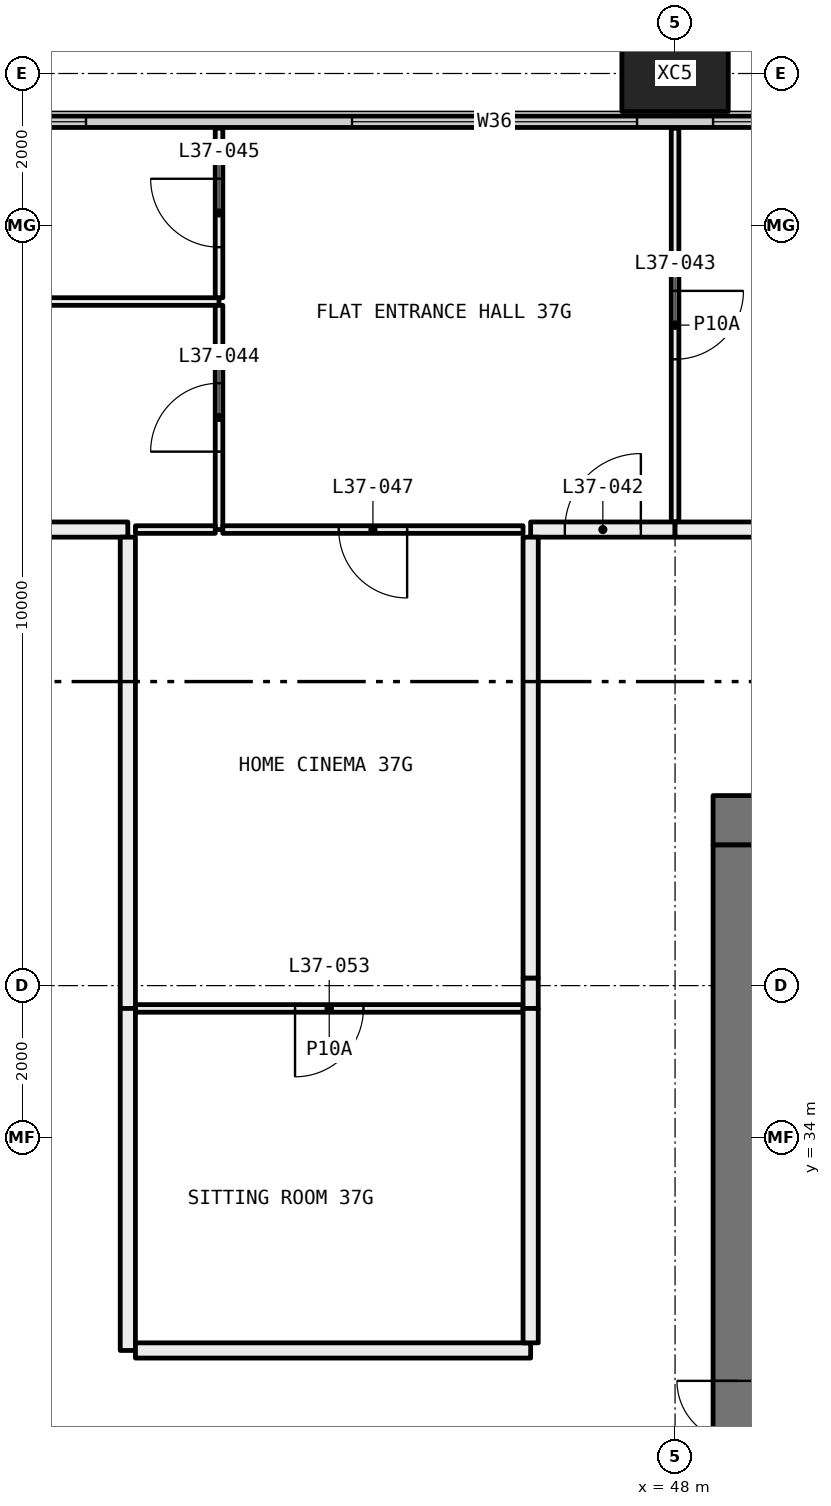
"""IFC4 building model, lengths in metres.
Left out: names, types, materials, properties, quantities, classifications, styles, units other than length and angle.
Written with IfcOpenShell. Run it as: python <this file> out.ifc"""

import sys

from ifc_helpers import new_model, si_unit, direction, frame, frame_2d, origin, origin_2d, place, context, subcontext, project, spatial, rectangle, hollow_rectangle, extrude, element, fill, save


model = new_model("IFC4")
c1 = context("Model", 3, precision=1e-05, world=origin(), true_north=direction((0.0, 1.0)))
c2 = subcontext(c1, "Body", "Model", "MODEL_VIEW")
j1 = project(units=[si_unit("LENGTHUNIT", "METRE"), si_unit("PLANEANGLEUNIT", "RADIAN")], contexts=[c1])
p1 = place(None, origin())
s1 = spatial("IfcSite", under=j1, at=p1, CompositionType="ELEMENT")
p2 = place(p1, origin())
s2 = spatial("IfcBuilding", under=s1, at=p2, CompositionType="ELEMENT")
p3 = place(p2, frame((0.0, 0.0, 141.45)))
s3 = spatial("IfcBuildingStorey", under=s2, at=p3, CompositionType="ELEMENT", Elevation=141.45)
p4 = place(p3, frame((48.0, 48.0, -0.4), z_axis=(0.0, 0.0, 1.0), x_axis=(1.0, 0.0, 0.0)))
e1 = element("IfcColumn", 1, at=p4, inside=s3, PredefinedType="COLUMN", context=c2, shape_type="SweptSolid", body=[
    extrude(hollow_rectangle(XDim=1.4, YDim=1.0, WallThickness=0.055, at=origin_2d()), origin(), (0.0, 0.0, 1.0), 3.45),
])
p5 = place(p3, frame((6.56, 47.365, 0.0), z_axis=(0.0, 0.0, 1.0), x_axis=(1.0, 0.0, 0.0)))
e2 = element("IfcWall", 2, at=p5, inside=s3, PredefinedType="ELEMENTEDWALL", context=c2, shape_type="SweptSolid", body=[
    extrude(rectangle(XDim=58.88, YDim=0.15, at=frame_2d((29.44, 0.0))), origin(), (0.0, 0.0, 1.0), 3.05),
])
p6 = place(p5, frame((0.44, 0.0, 0.45)))
e3 = element("IfcOpeningElement", 3, at=p6, cuts=e2, PredefinedType="OPENING", context=c2, shape_type="SweptSolid", body=[
    extrude(rectangle(XDim=4.5, YDim=2.55, at=frame_2d((2.25, 1.275))), frame((0.0, 0.085, 0.0), z_axis=(0.0, -1.0, 0.0), x_axis=(1.0, 0.0, 0.0)), (0.0, 0.0, 1.0), 0.17),
])
p7 = place(p5, frame((5.94, 0.0, 0.45)))
e4 = element("IfcOpeningElement", 4, at=p7, cuts=e2, PredefinedType="OPENING", context=c2, shape_type="SweptSolid", body=[
    extrude(rectangle(XDim=3.75, YDim=2.55, at=frame_2d((1.875, 1.275))), frame((0.0, 0.085, 0.0), z_axis=(0.0, -1.0, 0.0), x_axis=(1.0, 0.0, 0.0)), (0.0, 0.0, 1.0), 0.17),
])
p8 = place(p5, frame((13.19, 0.0, 0.45)))
e5 = element("IfcOpeningElement", 5, at=p8, cuts=e2, PredefinedType="OPENING", context=c2, shape_type="SweptSolid", body=[
    extrude(rectangle(XDim=3.75, YDim=2.55, at=frame_2d((1.875, 1.275))), frame((0.0, 0.085, 0.0), z_axis=(0.0, -1.0, 0.0), x_axis=(1.0, 0.0, 0.0)), (0.0, 0.0, 1.0), 0.17),
])
p9 = place(p5, frame((17.94, 0.0, 0.45)))
e6 = element("IfcOpeningElement", 6, at=p9, cuts=e2, PredefinedType="OPENING", context=c2, shape_type="SweptSolid", body=[
    extrude(rectangle(XDim=3.75, YDim=2.55, at=frame_2d((1.875, 1.275))), frame((0.0, 0.085, 0.0), z_axis=(0.0, -1.0, 0.0), x_axis=(1.0, 0.0, 0.0)), (0.0, 0.0, 1.0), 0.17),
])
p10 = place(p5, frame((25.19, 0.0, 0.45)))
e7 = element("IfcOpeningElement", 7, at=p10, cuts=e2, PredefinedType="OPENING", context=c2, shape_type="SweptSolid", body=[
    extrude(rectangle(XDim=0.75, YDim=2.55, at=frame_2d((0.375, 1.275))), frame((0.0, 0.085, 0.0), z_axis=(0.0, -1.0, 0.0), x_axis=(1.0, 0.0, 0.0)), (0.0, 0.0, 1.0), 0.17),
])
p11 = place(p5, frame((26.94, 0.0, 0.45)))
e8 = element("IfcOpeningElement", 8, at=p11, cuts=e2, PredefinedType="OPENING", context=c2, shape_type="SweptSolid", body=[
    extrude(rectangle(XDim=2.0, YDim=2.55, at=frame_2d((1.0, 1.275))), frame((0.0, 0.085, 0.0), z_axis=(0.0, -1.0, 0.0), x_axis=(1.0, 0.0, 0.0)), (0.0, 0.0, 1.0), 0.17),
])
p12 = place(p5, frame((29.94, 0.0, 0.45)))
e9 = element("IfcOpeningElement", 9, at=p12, cuts=e2, PredefinedType="OPENING", context=c2, shape_type="SweptSolid", body=[
    extrude(rectangle(XDim=3.75, YDim=2.55, at=frame_2d((1.875, 1.275))), frame((0.0, 0.085, 0.0), z_axis=(0.0, -1.0, 0.0), x_axis=(1.0, 0.0, 0.0)), (0.0, 0.0, 1.0), 0.17),
])
p13 = place(p5, frame((37.19, 0.0, 0.45)))
e10 = element("IfcOpeningElement", 10, at=p13, cuts=e2, PredefinedType="OPENING", context=c2, shape_type="SweptSolid", body=[
    extrude(rectangle(XDim=3.75, YDim=2.55, at=frame_2d((1.875, 1.275))), frame((0.0, 0.085, 0.0), z_axis=(0.0, -1.0, 0.0), x_axis=(1.0, 0.0, 0.0)), (0.0, 0.0, 1.0), 0.17),
])
p14 = place(p5, frame((41.94, 0.0, 0.45)))
e11 = element("IfcOpeningElement", 11, at=p14, cuts=e2, PredefinedType="OPENING", context=c2, shape_type="SweptSolid", body=[
    extrude(rectangle(XDim=3.75, YDim=2.55, at=frame_2d((1.875, 1.275))), frame((0.0, 0.085, 0.0), z_axis=(0.0, -1.0, 0.0), x_axis=(1.0, 0.0, 0.0)), (0.0, 0.0, 1.0), 0.17),
])
p15 = place(p5, frame((49.19, 0.0, 0.45)))
e12 = element("IfcOpeningElement", 12, at=p15, cuts=e2, PredefinedType="OPENING", context=c2, shape_type="SweptSolid", body=[
    extrude(rectangle(XDim=0.75, YDim=2.55, at=frame_2d((0.375, 1.275))), frame((0.0, 0.085, 0.0), z_axis=(0.0, -1.0, 0.0), x_axis=(1.0, 0.0, 0.0)), (0.0, 0.0, 1.0), 0.17),
])
p16 = place(p5, frame((50.94, 0.0, 0.45)))
e13 = element("IfcOpeningElement", 13, at=p16, cuts=e2, PredefinedType="OPENING", context=c2, shape_type="SweptSolid", body=[
    extrude(rectangle(XDim=2.0, YDim=2.55, at=frame_2d((1.0, 1.275))), frame((0.0, 0.085, 0.0), z_axis=(0.0, -1.0, 0.0), x_axis=(1.0, 0.0, 0.0)), (0.0, 0.0, 1.0), 0.17),
])
p17 = place(p5, frame((53.94, 0.0, 0.45)))
e14 = element("IfcOpeningElement", 14, at=p17, cuts=e2, PredefinedType="OPENING", context=c2, shape_type="SweptSolid", body=[
    extrude(rectangle(XDim=4.5, YDim=2.55, at=frame_2d((2.25, 1.275))), frame((0.0, 0.085, 0.0), z_axis=(0.0, -1.0, 0.0), x_axis=(1.0, 0.0, 0.0)), (0.0, 0.0, 1.0), 0.17),
])
p18 = place(p3, frame((42.0, 45.0, 0.0), z_axis=(0.0, 0.0, 1.0), x_axis=(-1.0, 0.0, 0.0)))
e15 = element("IfcWall", 15, at=p18, inside=s3, PredefinedType="PARTITIONING", context=c2, shape_type="SweptSolid", body=[
    extrude(rectangle(XDim=6.1, YDim=0.1, at=frame_2d((3.05, 0.0))), origin(), (0.0, 0.0, 1.0), 2.45),
])
p19 = place(p3, frame((42.0, 42.0, 0.0), z_axis=(0.0, 0.0, 1.0), x_axis=(0.0, 1.0, 0.0)))
e16 = element("IfcWall", 16, at=p19, inside=s3, PredefinedType="PARTITIONING", context=c2, shape_type="SweptSolid", body=[
    extrude(rectangle(XDim=2.95, YDim=0.1, at=frame_2d((1.475, 0.0))), origin(), (0.0, 0.0, 1.0), 3.05),
])
p20 = place(p19, frame((1.025, 0.0, 0.0)))
e17 = element("IfcOpeningElement", 17, at=p20, cuts=e16, PredefinedType="OPENING", context=c2, shape_type="SweptSolid", body=[
    extrude(rectangle(XDim=0.9, YDim=2.1, at=frame_2d((0.45, 1.05))), frame((0.0, 0.06, 0.0), z_axis=(0.0, -1.0, 0.0), x_axis=(1.0, 0.0, 0.0)), (0.0, 0.0, 1.0), 0.12),
])
p21 = place(p3, frame((40.9, 42.0, 0.0), z_axis=(0.0, 0.0, 1.0), x_axis=(1.0, 0.0, 0.0)))
e18 = element("IfcWall", 18, at=p21, inside=s3, PredefinedType="PARTITIONING", context=c2, shape_type="SweptSolid", body=[
    extrude(rectangle(XDim=1.05, YDim=0.1, at=frame_2d((0.525, 0.0))), origin(), (0.0, 0.0, 1.0), 3.05),
])
p22 = place(p3, frame((38.4, 42.0, 0.0), z_axis=(0.0, 0.0, 1.0), x_axis=(1.0, 0.0, 0.0)))
e19 = element("IfcWall", 19, at=p22, inside=s3, PredefinedType="PARTITIONING", context=c2, shape_type="SweptSolid", body=[
    extrude(rectangle(XDim=2.4, YDim=0.2, at=frame_2d((1.2, 0.0))), origin(), (0.0, 0.0, 1.0), 3.05),
])
p23 = place(p3, frame((42.0, 45.05, 0.0), z_axis=(0.0, 0.0, 1.0), x_axis=(0.0, 1.0, 0.0)))
e20 = element("IfcWall", 20, at=p23, inside=s3, PredefinedType="PARTITIONING", context=c2, shape_type="SweptSolid", body=[
    extrude(rectangle(XDim=2.23, YDim=0.1, at=frame_2d((1.115, 0.0))), origin(), (0.0, 0.0, 1.0), 3.05),
])
p24 = place(p23, frame((0.665, 0.0, 0.0)))
e21 = element("IfcOpeningElement", 21, at=p24, cuts=e20, PredefinedType="OPENING", context=c2, shape_type="SweptSolid", body=[
    extrude(rectangle(XDim=0.9, YDim=2.1, at=frame_2d((0.45, 1.05))), frame((0.0, 0.06, 0.0), z_axis=(0.0, -1.0, 0.0), x_axis=(1.0, 0.0, 0.0)), (0.0, 0.0, 1.0), 0.12),
])
p25 = place(p3, frame((48.0, 42.1, 0.0), z_axis=(0.0, 0.0, 1.0), x_axis=(0.0, 1.0, 0.0)))
e22 = element("IfcWall", 22, at=p25, inside=s3, PredefinedType="PARTITIONING", context=c2, shape_type="SweptSolid", body=[
    extrude(rectangle(XDim=5.18, YDim=0.1, at=frame_2d((2.59, 0.0))), origin(), (0.0, 0.0, 1.0), 3.05),
])
p26 = place(p25, frame((2.14, 0.0, 0.0)))
e23 = element("IfcOpeningElement", 23, at=p26, cuts=e22, PredefinedType="OPENING", context=c2, shape_type="SweptSolid", body=[
    extrude(rectangle(XDim=0.9, YDim=2.1, at=frame_2d((0.45, 1.05))), frame((0.0, 0.06, 0.0), z_axis=(0.0, -1.0, 0.0), x_axis=(1.0, 0.0, 0.0)), (0.0, 0.0, 1.0), 0.12),
])
p27 = place(p3, frame((42.05, 42.0, 0.0), z_axis=(0.0, 0.0, 1.0), x_axis=(1.0, 0.0, 0.0)))
e24 = element("IfcWall", 24, at=p27, inside=s3, PredefinedType="PARTITIONING", context=c2, shape_type="SweptSolid", body=[
    extrude(rectangle(XDim=3.95, YDim=0.1, at=frame_2d((1.975, 0.0))), origin(), (0.0, 0.0, 1.0), 3.05),
])
p28 = place(p27, frame((1.525, 0.0, 0.0)))
e25 = element("IfcOpeningElement", 25, at=p28, cuts=e24, PredefinedType="OPENING", context=c2, shape_type="SweptSolid", body=[
    extrude(rectangle(XDim=0.9, YDim=2.1, at=frame_2d((0.45, 1.05))), frame((0.0, 0.06, 0.0), z_axis=(0.0, -1.0, 0.0), x_axis=(1.0, 0.0, 0.0)), (0.0, 0.0, 1.0), 0.12),
])
p29 = place(p3, frame((46.1, 42.0, 0.0), z_axis=(0.0, 0.0, 1.0), x_axis=(1.0, 0.0, 0.0)))
e26 = element("IfcWall", 26, at=p29, inside=s3, PredefinedType="PARTITIONING", context=c2, shape_type="SweptSolid", body=[
    extrude(rectangle(XDim=1.9, YDim=0.2, at=frame_2d((0.95, 0.0))), origin(), (0.0, 0.0, 1.0), 3.05),
])
p30 = place(p29, frame((0.45, 0.0, 0.0)))
e27 = element("IfcOpeningElement", 27, at=p30, cuts=e26, PredefinedType="OPENING", context=c2, shape_type="SweptSolid", body=[
    extrude(rectangle(XDim=1.0, YDim=2.1, at=frame_2d((0.5, 1.05))), frame((0.0, 0.11, 0.0), z_axis=(0.0, -1.0, 0.0), x_axis=(1.0, 0.0, 0.0)), (0.0, 0.0, 1.0), 0.22),
])
p31 = place(p3, frame((48.0, 42.0, 0.0), z_axis=(0.0, 0.0, 1.0), x_axis=(1.0, 0.0, 0.0)))
e28 = element("IfcWall", 28, at=p31, inside=s3, PredefinedType="PARTITIONING", context=c2, shape_type="SweptSolid", body=[
    extrude(rectangle(XDim=12.0, YDim=0.2, at=frame_2d((6.0, 0.0))), origin(), (0.0, 0.0, 1.0), 3.05),
])
p32 = place(p3, frame((40.9, 35.7, 0.0), z_axis=(0.0, 0.0, 1.0), x_axis=(1.0, 0.0, 0.0)))
e29 = element("IfcWall", 29, at=p32, inside=s3, PredefinedType="PARTITIONING", context=c2, shape_type="SweptSolid", body=[
    extrude(rectangle(XDim=5.1, YDim=0.1, at=frame_2d((2.55, 0.0))), origin(), (0.0, 0.0, 1.0), 3.05),
])
p33 = place(p32, frame((2.1, 0.0, 0.0)))
e30 = element("IfcOpeningElement", 30, at=p33, cuts=e29, PredefinedType="OPENING", context=c2, shape_type="SweptSolid", body=[
    extrude(rectangle(XDim=0.9, YDim=2.1, at=frame_2d((0.45, 1.05))), frame((0.0, 0.06, 0.0), z_axis=(0.0, -1.0, 0.0), x_axis=(1.0, 0.0, 0.0)), (0.0, 0.0, 1.0), 0.12),
])
p34 = place(p3, frame((40.8, 41.9, 0.0), z_axis=(0.0, 0.0, 1.0), x_axis=(0.0, -1.0, 0.0)))
e31 = element("IfcWall", 31, at=p34, inside=s3, PredefinedType="PARTITIONING", context=c2, shape_type="SweptSolid", body=[
    extrude(rectangle(XDim=6.2, YDim=0.2, at=frame_2d((3.1, 0.0))), origin(), (0.0, 0.0, 1.0), 2.45),
])
p35 = place(p3, frame((46.1, 35.7, 0.0), z_axis=(0.0, 0.0, 1.0), x_axis=(0.0, 1.0, 0.0)))
e32 = element("IfcWall", 32, at=p35, inside=s3, PredefinedType="PARTITIONING", context=c2, shape_type="SweptSolid", body=[
    extrude(rectangle(XDim=0.4, YDim=0.2, at=frame_2d((0.2, 0.0))), origin(), (0.0, 0.0, 1.0), 2.45),
])
p36 = place(p3, frame((46.1, 36.1, 0.0), z_axis=(0.0, 0.0, 1.0), x_axis=(0.0, 1.0, 0.0)))
e33 = element("IfcWall", 33, at=p36, inside=s3, PredefinedType="PARTITIONING", context=c2, shape_type="SweptSolid", body=[
    extrude(rectangle(XDim=5.8, YDim=0.2, at=frame_2d((2.9, 0.0))), origin(), (0.0, 0.0, 1.0), 3.05),
])
p37 = place(p3, frame((40.8, 35.7, 0.0), z_axis=(0.0, 0.0, 1.0), x_axis=(0.0, -1.0, 0.0)))
e34 = element("IfcWall", 34, at=p37, inside=s3, PredefinedType="PARTITIONING", context=c2, shape_type="SweptSolid", body=[
    extrude(rectangle(XDim=4.5, YDim=0.2, at=frame_2d((2.25, 0.0))), origin(), (0.0, 0.0, 1.0), 3.05),
])
p38 = place(p3, frame((40.9, 31.2, 0.0), z_axis=(0.0, 0.0, 1.0), x_axis=(1.0, 0.0, 0.0)))
e35 = element("IfcWall", 35, at=p38, inside=s3, PredefinedType="PARTITIONING", context=c2, shape_type="SweptSolid", body=[
    extrude(rectangle(XDim=5.2, YDim=0.2, at=frame_2d((2.6, 0.0))), origin(), (0.0, 0.0, 1.0), 3.05),
])
p39 = place(p3, frame((46.1, 31.3, 0.0), z_axis=(0.0, 0.0, 1.0), x_axis=(0.0, 1.0, 0.0)))
e36 = element("IfcWall", 36, at=p39, inside=s3, PredefinedType="PARTITIONING", context=c2, shape_type="SweptSolid", body=[
    extrude(rectangle(XDim=4.4, YDim=0.2, at=frame_2d((2.2, 0.0))), origin(), (0.0, 0.0, 1.0), 3.05),
])
p40 = place(p3, frame((59.5, 38.175, 0.0), z_axis=(0.0, 0.0, 1.0), x_axis=(-1.0, 0.0, 0.0)))
e37 = element("IfcWall", 37, at=p40, inside=s3, PredefinedType="SHEAR", context=c2, shape_type="SweptSolid", body=[
    extrude(rectangle(XDim=11.0, YDim=0.65, at=frame_2d((5.5, 0.0))), origin(), (0.0, 0.0, 1.0), 3.05),
])
p41 = place(p40, frame((8.475, 0.0, 0.0)))
e38 = element("IfcOpeningElement", 38, at=p41, cuts=e37, PredefinedType="OPENING", context=c2, shape_type="SweptSolid", body=[
    extrude(rectangle(XDim=1.6, YDim=2.1, at=frame_2d((0.8, 1.05))), frame((0.0, 0.335, 0.0), z_axis=(0.0, -1.0, 0.0), x_axis=(1.0, 0.0, 0.0)), (0.0, 0.0, 1.0), 0.67),
])
p42 = place(p3, frame((48.825, 22.15, 0.0), z_axis=(0.0, 0.0, 1.0), x_axis=(0.0, 1.0, 0.0)))
e39 = element("IfcWall", 39, at=p42, inside=s3, PredefinedType="SHEAR", context=c2, shape_type="SweptSolid", body=[
    extrude(rectangle(XDim=15.7, YDim=0.65, at=frame_2d((7.85, 0.0))), origin(), (0.0, 0.0, 1.0), 3.05),
])
p43 = place(p42, frame((7.05, 0.0, 0.0)))
e40 = element("IfcOpeningElement", 40, at=p43, cuts=e39, PredefinedType="OPENING", context=c2, shape_type="SweptSolid", body=[
    extrude(rectangle(XDim=1.6, YDim=2.1, at=frame_2d((0.8, 1.05))), frame((0.0, 0.335, 0.0), z_axis=(0.0, -1.0, 0.0), x_axis=(1.0, 0.0, 0.0)), (0.0, 0.0, 1.0), 0.67),
])
p44 = place(p12, origin())
e41 = element("IfcWindow", 41, at=p44, inside=s3, PartitioningType="SINGLE_PANEL", PredefinedType="WINDOW", context=c2, shape_type="SweptSolid", body=[
    extrude(rectangle(XDim=3.75, YDim=2.55, at=frame_2d((1.875, 1.275))), frame((0.0, 0.03, 0.0), z_axis=(0.0, -1.0, 0.0), x_axis=(1.0, 0.0, 0.0)), (0.0, 0.0, 1.0), 0.06),
])
fill(e9, e41)
p45 = place(p13, origin())
e42 = element("IfcWindow", 42, at=p45, inside=s3, PartitioningType="SINGLE_PANEL", PredefinedType="WINDOW", context=c2, shape_type="SweptSolid", body=[
    extrude(rectangle(XDim=3.75, YDim=2.55, at=frame_2d((1.875, 1.275))), frame((0.0, 0.03, 0.0), z_axis=(0.0, -1.0, 0.0), x_axis=(1.0, 0.0, 0.0)), (0.0, 0.0, 1.0), 0.06),
])
fill(e10, e42)
p46 = place(p14, origin())
e43 = element("IfcWindow", 43, at=p46, inside=s3, PartitioningType="SINGLE_PANEL", PredefinedType="WINDOW", context=c2, shape_type="SweptSolid", body=[
    extrude(rectangle(XDim=3.75, YDim=2.55, at=frame_2d((1.875, 1.275))), frame((0.0, 0.03, 0.0), z_axis=(0.0, -1.0, 0.0), x_axis=(1.0, 0.0, 0.0)), (0.0, 0.0, 1.0), 0.06),
])
fill(e11, e43)
p47 = place(p30, origin())
e44 = element("IfcDoor", 44, at=p47, inside=s3, OperationType="SINGLE_SWING_LEFT", PredefinedType="DOOR", context=c2, shape_type="SweptSolid", body=[
    extrude(rectangle(XDim=1.0, YDim=2.1, at=frame_2d((0.5, 1.05))), frame((0.0, 0.025, 0.0), z_axis=(0.0, -1.0, 0.0), x_axis=(1.0, 0.0, 0.0)), (0.0, 0.0, 1.0), 0.05),
])
fill(e27, e44)
p48 = place(p26, frame((0.9, 0.0, 0.0), x_axis=(-1.0, 0.0, 0.0)))
e45 = element("IfcDoor", 45, at=p48, inside=s3, OperationType="SINGLE_SWING_RIGHT", PredefinedType="DOOR", context=c2, shape_type="SweptSolid", body=[
    extrude(rectangle(XDim=0.9, YDim=2.1, at=frame_2d((0.45, 1.05))), frame((0.0, 0.025, 0.0), z_axis=(0.0, -1.0, 0.0), x_axis=(1.0, 0.0, 0.0)), (0.0, 0.0, 1.0), 0.05),
])
fill(e23, e45)
p49 = place(p20, origin())
e46 = element("IfcDoor", 46, at=p49, inside=s3, OperationType="SINGLE_SWING_RIGHT", PredefinedType="DOOR", context=c2, shape_type="SweptSolid", body=[
    extrude(rectangle(XDim=0.9, YDim=2.1, at=frame_2d((0.45, 1.05))), frame((0.0, 0.025, 0.0), z_axis=(0.0, -1.0, 0.0), x_axis=(1.0, 0.0, 0.0)), (0.0, 0.0, 1.0), 0.05),
])
fill(e17, e46)
p50 = place(p24, origin())
e47 = element("IfcDoor", 47, at=p50, inside=s3, OperationType="SINGLE_SWING_LEFT", PredefinedType="DOOR", context=c2, shape_type="SweptSolid", body=[
    extrude(rectangle(XDim=0.9, YDim=2.1, at=frame_2d((0.45, 1.05))), frame((0.0, 0.025, 0.0), z_axis=(0.0, -1.0, 0.0), x_axis=(1.0, 0.0, 0.0)), (0.0, 0.0, 1.0), 0.05),
])
fill(e21, e47)
p51 = place(p28, frame((0.9, 0.0, 0.0), x_axis=(-1.0, 0.0, 0.0)))
e48 = element("IfcDoor", 48, at=p51, inside=s3, OperationType="SINGLE_SWING_RIGHT", PredefinedType="DOOR", context=c2, shape_type="SweptSolid", body=[
    extrude(rectangle(XDim=0.9, YDim=2.1, at=frame_2d((0.45, 1.05))), frame((0.0, 0.025, 0.0), z_axis=(0.0, -1.0, 0.0), x_axis=(1.0, 0.0, 0.0)), (0.0, 0.0, 1.0), 0.05),
])
fill(e25, e48)
p52 = place(p33, frame((0.9, 0.0, 0.0), x_axis=(-1.0, 0.0, 0.0)))
e49 = element("IfcDoor", 49, at=p52, inside=s3, OperationType="SINGLE_SWING_LEFT", PredefinedType="DOOR", context=c2, shape_type="SweptSolid", body=[
    extrude(rectangle(XDim=0.9, YDim=2.1, at=frame_2d((0.45, 1.05))), frame((0.0, 0.025, 0.0), z_axis=(0.0, -1.0, 0.0), x_axis=(1.0, 0.0, 0.0)), (0.0, 0.0, 1.0), 0.05),
])
fill(e30, e49)
p53 = place(p43, origin())
e50 = element("IfcDoor", 50, at=p53, inside=s3, OperationType="DOUBLE_DOOR_SINGLE_SWING", PredefinedType="DOOR", context=c2, shape_type="SweptSolid", body=[
    extrude(rectangle(XDim=1.6, YDim=2.1, at=frame_2d((0.8, 1.05))), frame((0.0, 0.025, 0.0), z_axis=(0.0, -1.0, 0.0), x_axis=(1.0, 0.0, 0.0)), (0.0, 0.0, 1.0), 0.05),
])
fill(e40, e50)
save(model, sys.argv[1])
